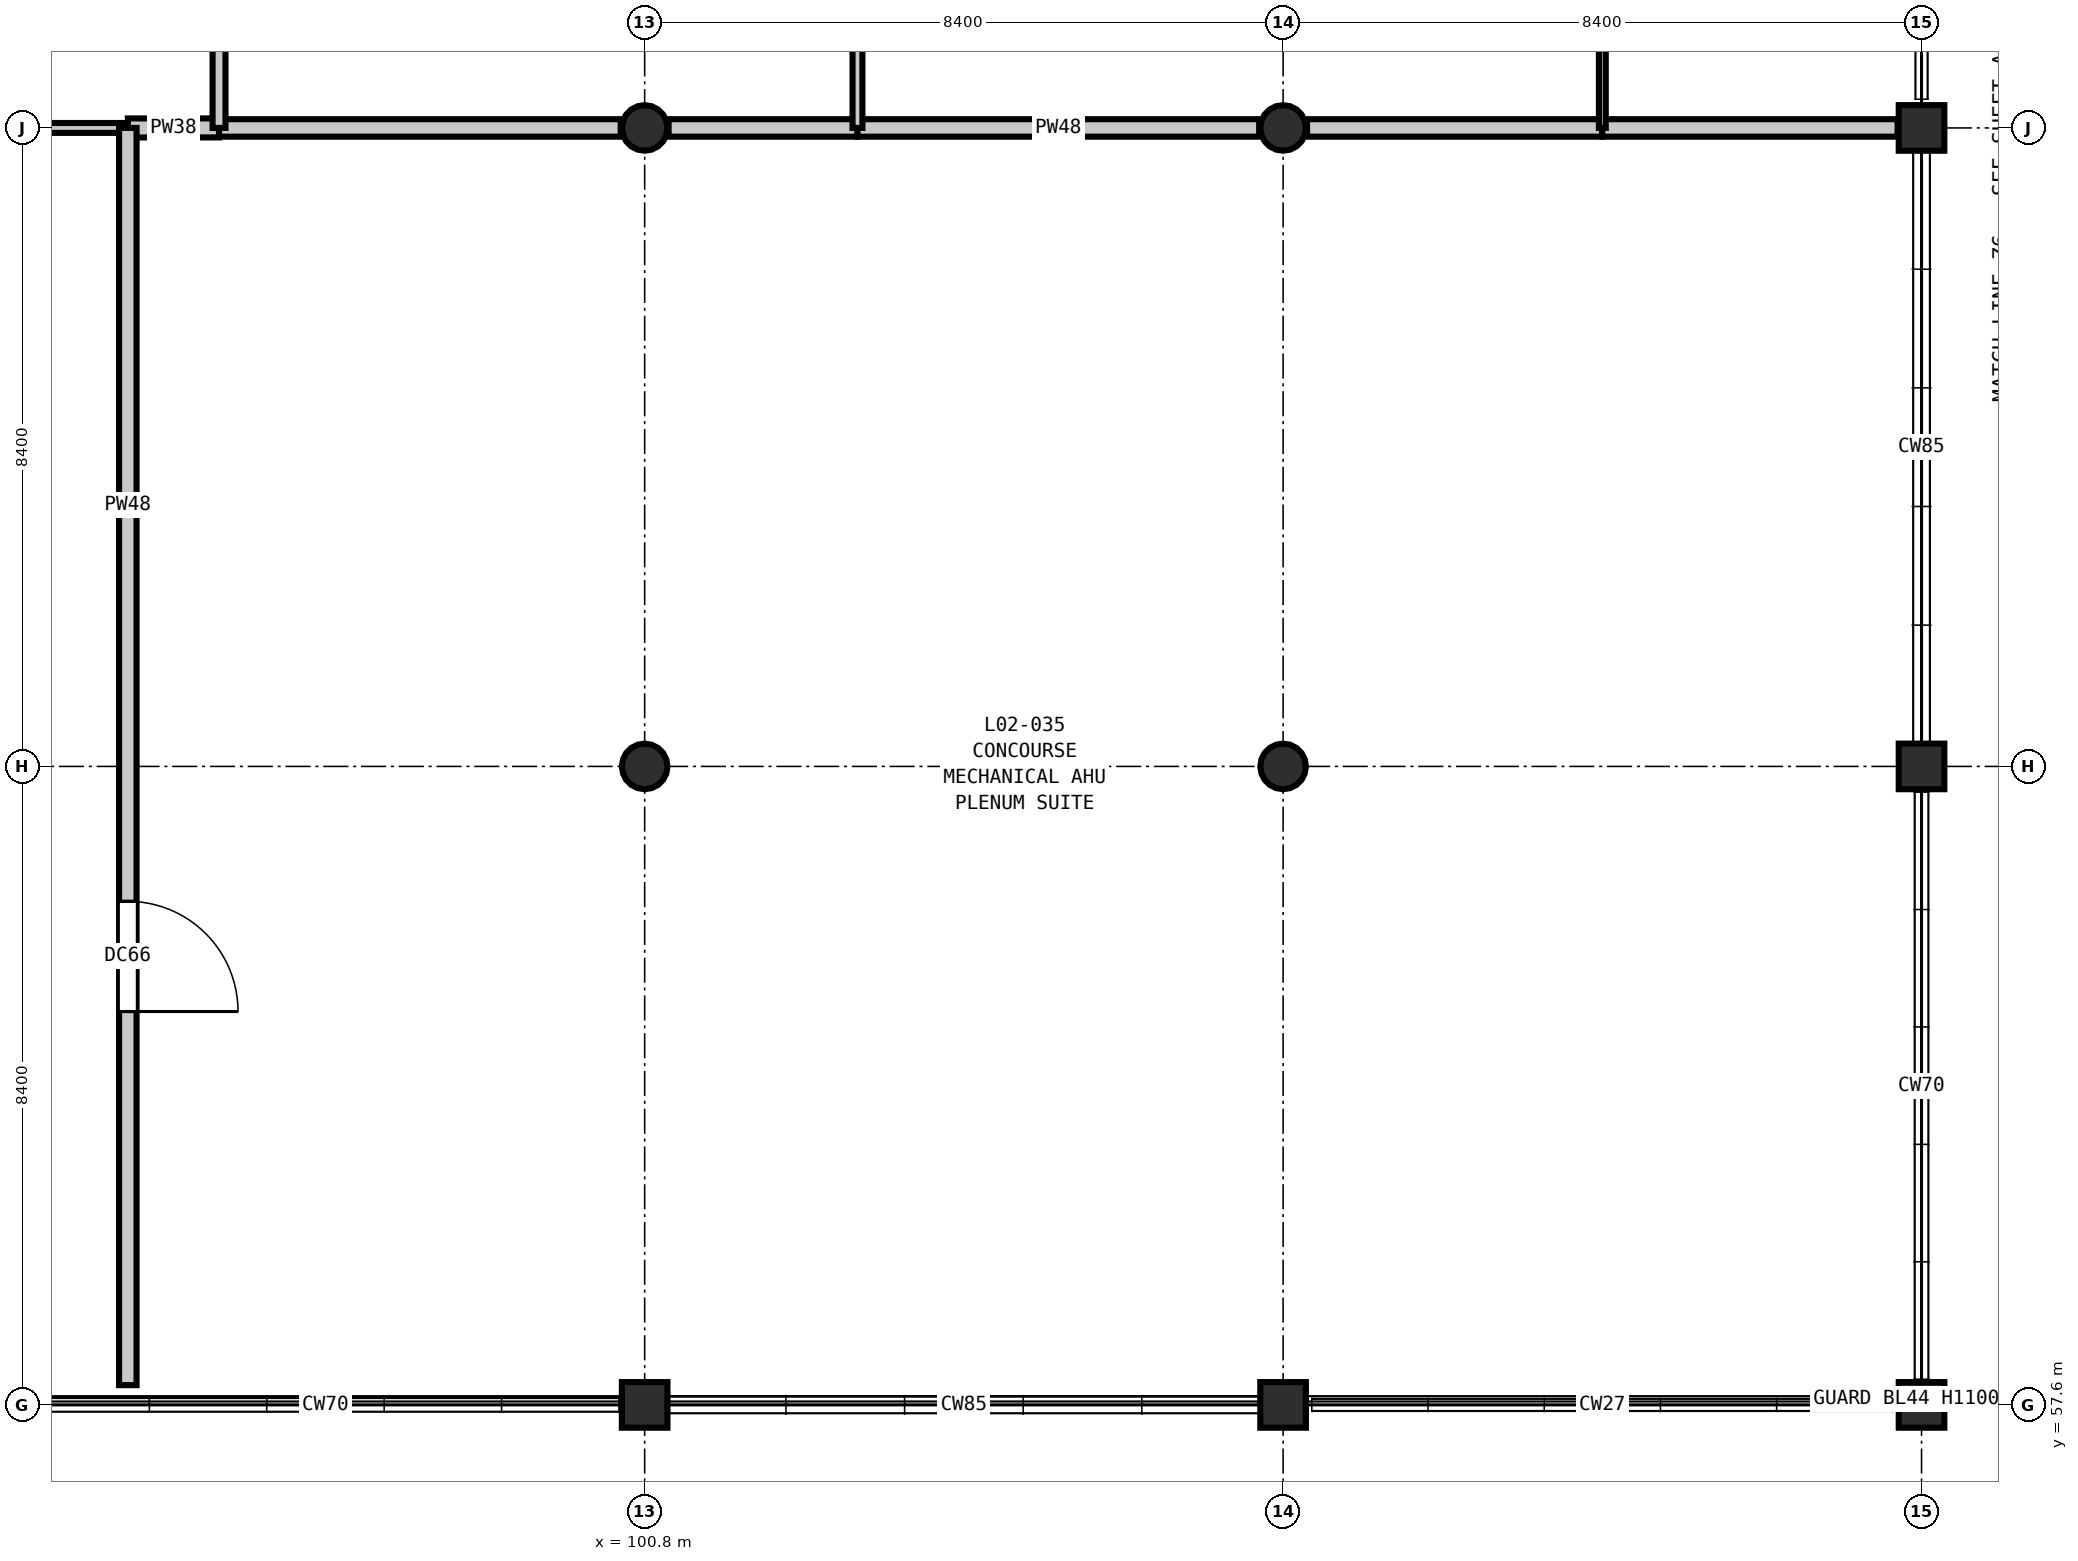
"""IFC4 building model, lengths in metres.
Left out: names, types, materials, properties, quantities, classifications, styles, units other than length and angle.
Written with IfcOpenShell. Run it as: python <this file> out.ifc"""

import sys

from ifc_helpers import new_model, si_unit, direction, frame, frame_2d, origin, origin_2d, place, context, subcontext, project, spatial, rectangle, circle, extrude, element, fill, save


model = new_model("IFC4")
c1 = context("Model", 3, precision=1e-05, world=origin(), true_north=direction((0.0, 1.0)))
c2 = subcontext(c1, "Body", "Model", "MODEL_VIEW")
j1 = project(units=[si_unit("LENGTHUNIT", "METRE"), si_unit("PLANEANGLEUNIT", "RADIAN")], contexts=[c1])
p1 = place(None, origin())
s1 = spatial("IfcSite", under=j1, at=p1, CompositionType="ELEMENT")
p2 = place(p1, origin())
s2 = spatial("IfcBuilding", under=s1, at=p2, CompositionType="ELEMENT")
p3 = place(p2, frame((0.0, 0.0, 10.8)))
s3 = spatial("IfcBuildingStorey", under=s2, at=p3, CompositionType="ELEMENT", Elevation=10.8)
p4 = place(p3, frame((100.8, 57.6, 0.0), z_axis=(0.0, 0.0, 1.0), x_axis=(1.0, 0.0, 0.0)))
e1 = element("IfcColumn", 1, at=p4, inside=s3, PredefinedType="COLUMN", context=c2, shape_type="SweptSolid", body=[
    extrude(rectangle(XDim=0.6, YDim=0.6, at=origin_2d()), origin(), (0.0, 0.0, 1.0), 5.4),
])
for number, where, z_axis, x_axis in (
    (2, (100.8, 66.0, 0.0), (0.0, 0.0, 1.0), (1.0, 0.0, 0.0)),
    (3, (100.8, 74.4, 0.0), (0.0, 0.0, 1.0), (1.0, 0.0, 0.0)),
):
    element("IfcColumn", number, at=place(p3, frame(where, z_axis=z_axis, x_axis=x_axis)), inside=s3, PredefinedType="COLUMN", context=c2, shape_type="SweptSolid", body=[
        extrude(circle(Radius=0.3, at=origin_2d()), origin(), (0.0, 0.0, 1.0), 5.4),
    ])
p5 = place(p3, frame((109.2, 57.6, 0.0), z_axis=(0.0, 0.0, 1.0), x_axis=(1.0, 0.0, 0.0)))
e4 = element("IfcColumn", 4, at=p5, inside=s3, PredefinedType="COLUMN", context=c2, shape_type="SweptSolid", body=[
    extrude(rectangle(XDim=0.6, YDim=0.6, at=origin_2d()), origin(), (0.0, 0.0, 1.0), 5.4),
])
for number, where, z_axis, x_axis in (
    (5, (109.2, 66.0, 0.0), (0.0, 0.0, 1.0), (1.0, 0.0, 0.0)),
    (6, (109.2, 74.4, 0.0), (0.0, 0.0, 1.0), (1.0, 0.0, 0.0)),
):
    element("IfcColumn", number, at=place(p3, frame(where, z_axis=z_axis, x_axis=x_axis)), inside=s3, PredefinedType="COLUMN", context=c2, shape_type="SweptSolid", body=[
        extrude(circle(Radius=0.3, at=origin_2d()), origin(), (0.0, 0.0, 1.0), 5.4),
    ])
for number, where, z_axis, x_axis in (
    (7, (117.6, 57.6, 0.0), (0.0, 0.0, 1.0), (1.0, 0.0, 0.0)),
    (8, (117.6, 66.0, 0.0), (0.0, 0.0, 1.0), (1.0, 0.0, 0.0)),
    (9, (117.6, 74.4, 0.0), (0.0, 0.0, 1.0), (1.0, 0.0, 0.0)),
):
    element("IfcColumn", number, at=place(p3, frame(where, z_axis=z_axis, x_axis=x_axis)), inside=s3, PredefinedType="COLUMN", context=c2, shape_type="SweptSolid", body=[
        extrude(rectangle(XDim=0.6, YDim=0.6, at=origin_2d()), origin(), (0.0, 0.0, 1.0), 5.4),
    ])
p6 = place(p3, frame((92.715, 74.4, 0.0), z_axis=(0.0, 0.0, 1.0), x_axis=(1.0, 0.0, 0.0)))
e10 = element("IfcWall", 10, at=p6, inside=s3, PredefinedType="PARTITIONING", context=c2, shape_type="SweptSolid", body=[
    extrude(rectangle(XDim=1.285, YDim=0.13, at=frame_2d((0.643, 0.0))), origin(), (0.0, 0.0, 1.0), 4.735),
])
p7 = place(p3, frame((94.0, 74.4, 0.0), z_axis=(0.0, 0.0, 1.0), x_axis=(1.0, 0.0, 0.0)))
e11 = element("IfcWall", 11, at=p7, inside=s3, PredefinedType="PARTITIONING", context=c2, shape_type="SweptSolid", body=[
    extrude(rectangle(XDim=1.2, YDim=0.25, at=frame_2d((0.6, 0.0))), origin(), (0.0, 0.0, 1.0), 4.735),
])
p8 = place(p3, frame((95.2, 74.4, 0.0), z_axis=(0.0, 0.0, 1.0), x_axis=(1.0, 0.0, 0.0)))
e12 = element("IfcWall", 12, at=p8, inside=s3, PredefinedType="PARTITIONING", context=c2, shape_type="SweptSolid", body=[
    extrude(rectangle(XDim=5.285, YDim=0.23, at=frame_2d((2.643, 0.0))), origin(), (0.0, 0.0, 1.0), 4.735),
])
p9 = place(p3, frame((101.115, 74.4, 0.0), z_axis=(0.0, 0.0, 1.0), x_axis=(1.0, 0.0, 0.0)))
e13 = element("IfcWall", 13, at=p9, inside=s3, PredefinedType="PARTITIONING", context=c2, shape_type="SweptSolid", body=[
    extrude(rectangle(XDim=2.485, YDim=0.23, at=frame_2d((1.243, 0.0))), origin(), (0.0, 0.0, 1.0), 4.735),
])
p10 = place(p3, frame((103.6, 74.4, 0.0), z_axis=(0.0, 0.0, 1.0), x_axis=(1.0, 0.0, 0.0)))
e14 = element("IfcWall", 14, at=p10, inside=s3, PredefinedType="PARTITIONING", context=c2, shape_type="SweptSolid", body=[
    extrude(rectangle(XDim=5.285, YDim=0.23, at=frame_2d((2.643, 0.0))), origin(), (0.0, 0.0, 1.0), 4.735),
])
for number, where, z_axis, x_axis in (
    (15, (109.515, 74.4, 0.0), (0.0, 0.0, 1.0), (1.0, 0.0, 0.0)),
    (16, (113.4, 74.4, 0.0), (0.0, 0.0, 1.0), (1.0, 0.0, 0.0)),
):
    element("IfcWall", number, at=place(p3, frame(where, z_axis=z_axis, x_axis=x_axis)), inside=s3, PredefinedType="PARTITIONING", context=c2, shape_type="SweptSolid", body=[
        extrude(rectangle(XDim=3.885, YDim=0.23, at=frame_2d((1.942, 0.0))), origin(), (0.0, 0.0, 1.0), 4.735),
    ])
p11 = place(p3, frame((94.0, 57.86, 0.0), z_axis=(0.0, 0.0, 1.0), x_axis=(0.0, 1.0, 0.0)))
e17 = element("IfcWall", 17, at=p11, inside=s3, PredefinedType="PARTITIONING", context=c2, shape_type="SweptSolid", body=[
    extrude(rectangle(XDim=16.54, YDim=0.23, at=frame_2d((8.27, 0.0))), origin(), (0.0, 0.0, 1.0), 5.07),
])
p12 = place(p11, frame((4.915, 0.0, 0.0)))
e18 = element("IfcOpeningElement", 18, at=p12, cuts=e17, PredefinedType="OPENING", context=c2, shape_type="SweptSolid", body=[
    extrude(rectangle(XDim=1.45, YDim=2.25, at=frame_2d((0.725, 1.125))), frame((0.0, 0.125, 0.0), z_axis=(0.0, -1.0, 0.0), x_axis=(1.0, 0.0, 0.0)), (0.0, 0.0, 1.0), 0.25),
])
p13 = place(p3, frame((95.2, 74.4, 0.0), z_axis=(0.0, 0.0, 1.0), x_axis=(0.0, 1.0, 0.0)))
e19 = element("IfcWall", 19, at=p13, inside=s3, PredefinedType="PARTITIONING", context=c2, shape_type="SweptSolid", body=[
    extrude(rectangle(XDim=11.4, YDim=0.17, at=frame_2d((5.7, 0.0))), origin(), (0.0, 0.0, 1.0), 5.07),
])
p14 = place(p3, frame((103.6, 74.4, 0.0), z_axis=(0.0, 0.0, 1.0), x_axis=(0.0, 1.0, 0.0)))
e20 = element("IfcWall", 20, at=p14, inside=s3, PredefinedType="PARTITIONING", context=c2, shape_type="SweptSolid", body=[
    extrude(rectangle(XDim=11.4, YDim=0.13, at=frame_2d((5.7, 0.0))), origin(), (0.0, 0.0, 1.0), 5.07),
])
p15 = place(p3, frame((113.4, 74.4, 0.0), z_axis=(0.0, 0.0, 1.0), x_axis=(0.0, 1.0, 0.0)))
e21 = element("IfcWall", 21, at=p15, inside=s3, PredefinedType="PARTITIONING", context=c2, shape_type="SweptSolid", body=[
    extrude(rectangle(XDim=11.4, YDim=0.09, at=frame_2d((5.7, 0.0))), origin(), (0.0, 0.0, 1.0), 5.07),
])
p16 = place(p12, frame((1.45, 0.0, 0.0), z_axis=(0.0, 0.0, 1.0), x_axis=(-1.0, 0.0, 0.0)))
e22 = element("IfcDoor", 22, at=p16, inside=s3, OperationType="SINGLE_SWING_RIGHT", PredefinedType="DOOR", context=c2, shape_type="SweptSolid", body=[
    extrude(rectangle(XDim=1.45, YDim=2.25, at=frame_2d((0.725, 1.125))), frame((0.0, 0.025, 0.0), z_axis=(0.0, -1.0, 0.0), x_axis=(1.0, 0.0, 0.0)), (0.0, 0.0, 1.0), 0.05),
])
fill(e18, e22)
save(model, sys.argv[1])
